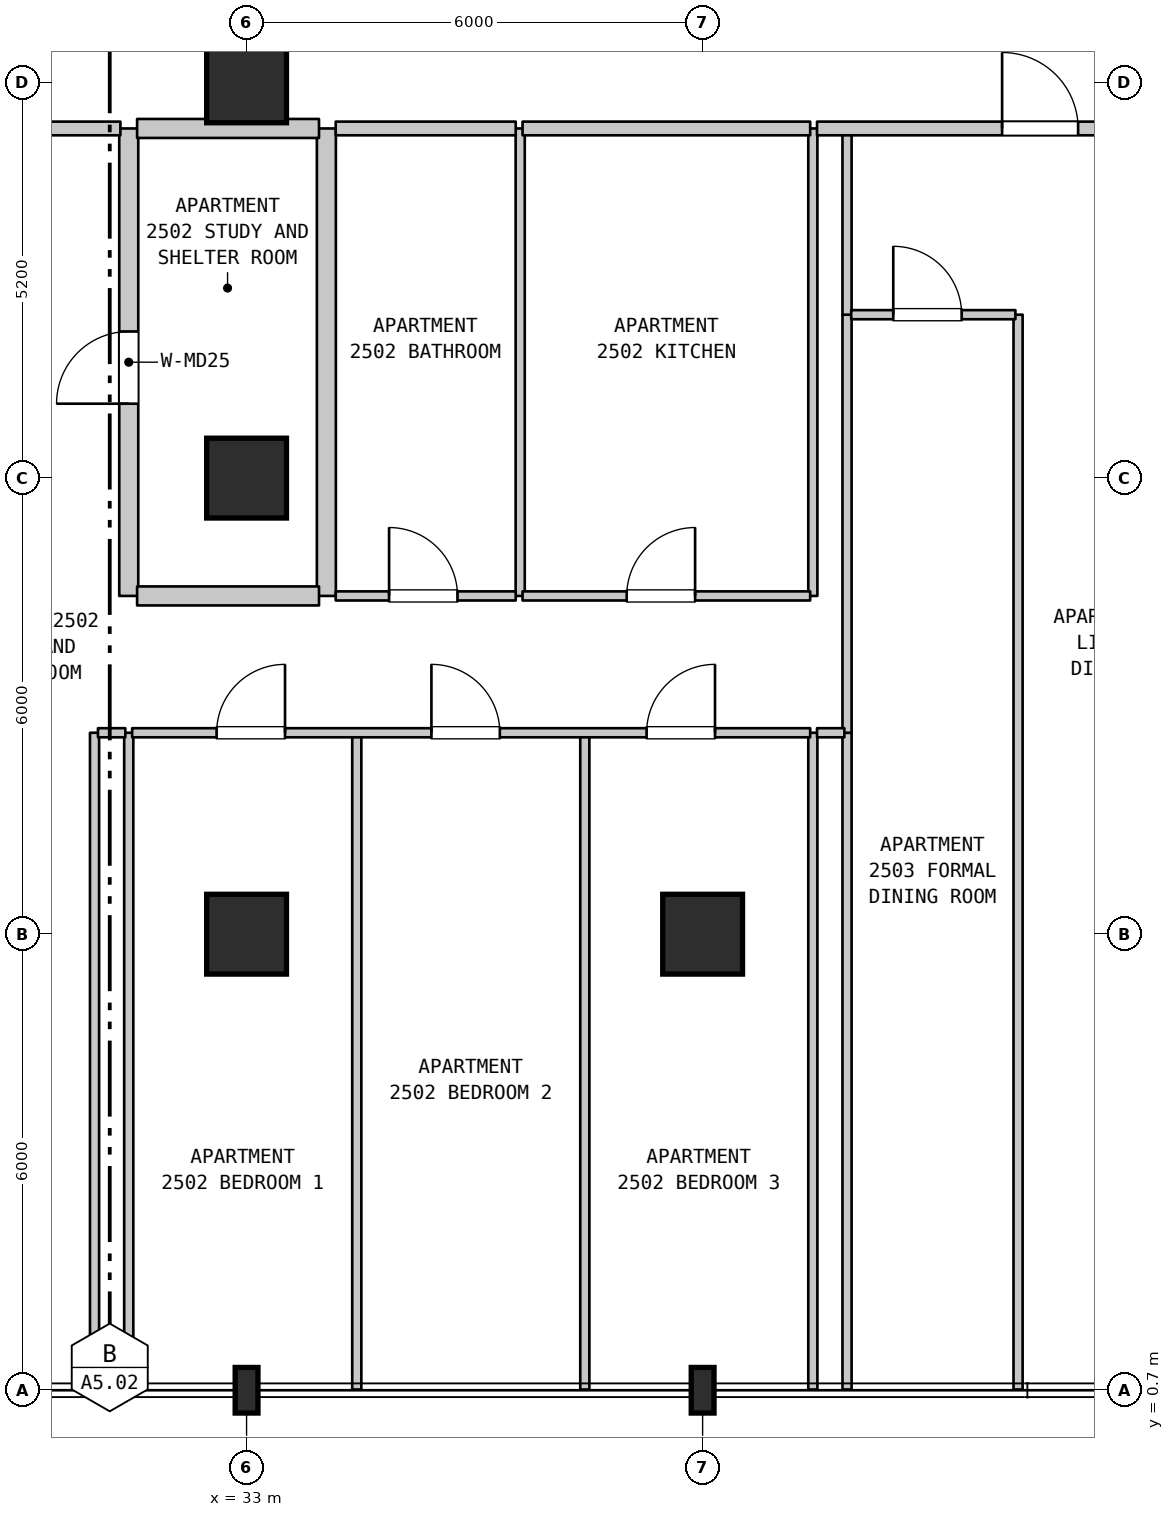
"""IFC4 building model, lengths in metres.
Left out: names, types, materials, properties, quantities, classifications, styles, units other than length and angle.
Written with IfcOpenShell. Run it as: python <this file> out.ifc"""

import sys

from ifc_helpers import new_model, si_unit, direction, frame, frame_2d, origin, origin_2d, place, context, subcontext, project, spatial, rectangle, i_section, extrude, element, fill, save


model = new_model("IFC4")
c1 = context("Model", 3, precision=1e-05, world=origin(), true_north=direction((0.0, 1.0)))
c2 = subcontext(c1, "Body", "Model", "MODEL_VIEW")
j1 = project(units=[si_unit("LENGTHUNIT", "METRE"), si_unit("PLANEANGLEUNIT", "RADIAN")], contexts=[c1])
p1 = place(None, origin())
s1 = spatial("IfcSite", under=j1, at=p1, CompositionType="ELEMENT")
p2 = place(p1, origin())
s2 = spatial("IfcBuilding", under=s1, at=p2, CompositionType="ELEMENT")
p3 = place(p2, frame((0.0, 0.0, 105.7)))
s3 = spatial("IfcBuildingStorey", under=s2, at=p3, CompositionType="ELEMENT", Elevation=105.7)
p4 = place(p3, frame((33.0, 0.7, 0.0), z_axis=(0.0, 0.0, 1.0), x_axis=(1.0, 0.0, 0.0)))
e1 = element("IfcColumn", 1, at=p4, inside=s3, PredefinedType="COLUMN", context=c2, shape_type="SweptSolid", body=[
    extrude(i_section(OverallWidth=0.3, OverallDepth=0.6, WebThickness=0.015, FlangeThickness=0.03, FilletRadius=0.027, at=origin_2d()), origin(), (0.0, 0.0, 1.0), 3.7),
])
for number, where, z_axis, x_axis in (
    (2, (33.0, 6.7, 0.0), (0.0, 0.0, 1.0), (1.0, 0.0, 0.0)),
    (3, (33.0, 12.7, 0.0), (0.0, 0.0, 1.0), (1.0, 0.0, 0.0)),
    (4, (33.0, 17.9, 0.0), (0.0, 0.0, 1.0), (1.0, 0.0, 0.0)),
):
    element("IfcColumn", number, at=place(p3, frame(where, z_axis=z_axis, x_axis=x_axis)), inside=s3, PredefinedType="COLUMN", context=c2, shape_type="SweptSolid", body=[
        extrude(rectangle(XDim=1.05, YDim=1.05, at=origin_2d()), origin(), (0.0, 0.0, 1.0), 3.7),
    ])
p5 = place(p3, frame((39.0, 0.7, 0.0), z_axis=(0.0, 0.0, 1.0), x_axis=(1.0, 0.0, 0.0)))
e5 = element("IfcColumn", 5, at=p5, inside=s3, PredefinedType="COLUMN", context=c2, shape_type="SweptSolid", body=[
    extrude(i_section(OverallWidth=0.3, OverallDepth=0.6, WebThickness=0.015, FlangeThickness=0.03, FilletRadius=0.027, at=origin_2d()), origin(), (0.0, 0.0, 1.0), 3.7),
])
p6 = place(p3, frame((39.0, 6.7, 0.0), z_axis=(0.0, 0.0, 1.0), x_axis=(1.0, 0.0, 0.0)))
e6 = element("IfcColumn", 6, at=p6, inside=s3, PredefinedType="COLUMN", context=c2, shape_type="SweptSolid", body=[
    extrude(rectangle(XDim=1.05, YDim=1.05, at=origin_2d()), origin(), (0.0, 0.0, 1.0), 3.7),
])
for number, where, z_axis, x_axis in (
    (7, (31.0, 0.71, 0.0), (0.0, 0.0, 1.0), (0.0, 1.0, 0.0)),
    (8, (31.45, 0.71, 0.0), (0.0, 0.0, 1.0), (0.0, 1.0, 0.0)),
):
    element("IfcWall", number, at=place(p3, frame(where, z_axis=z_axis, x_axis=x_axis)), inside=s3, PredefinedType="PARTITIONING", context=c2, shape_type="SweptSolid", body=[
        extrude(rectangle(XDim=8.64, YDim=0.12, at=frame_2d((4.32, 0.0))), origin(), (0.0, 0.0, 1.0), 3.385),
    ])
p7 = place(p3, frame((31.45, 11.15, 0.0), z_axis=(0.0, 0.0, 1.0), x_axis=(0.0, 1.0, 0.0)))
e9 = element("IfcWall", 9, at=p7, inside=s3, PredefinedType="STANDARD", context=c2, shape_type="SweptSolid", body=[
    extrude(rectangle(XDim=6.15, YDim=0.25, at=frame_2d((3.075, 0.0))), origin(), (0.0, 0.0, 1.0), 3.385),
])
p8 = place(p7, frame((2.529, 0.0, 0.0)))
e10 = element("IfcOpeningElement", 10, at=p8, cuts=e9, PredefinedType="OPENING", context=c2, shape_type="SweptSolid", body=[
    extrude(rectangle(XDim=0.95, YDim=2.15, at=frame_2d((0.475, 1.075))), frame((0.0, 0.135, 0.0), z_axis=(0.0, -1.0, 0.0), x_axis=(1.0, 0.0, 0.0)), (0.0, 0.0, 1.0), 0.27),
])
p9 = place(p3, frame((34.05, 11.15, 0.0), z_axis=(0.0, 0.0, 1.0), x_axis=(0.0, 1.0, 0.0)))
e11 = element("IfcWall", 11, at=p9, inside=s3, PredefinedType="STANDARD", context=c2, shape_type="SweptSolid", body=[
    extrude(rectangle(XDim=6.15, YDim=0.25, at=frame_2d((3.075, 0.0))), origin(), (0.0, 0.0, 1.0), 3.385),
])
p10 = place(p3, frame((34.45, 0.71, 0.0), z_axis=(0.0, 0.0, 1.0), x_axis=(0.0, 1.0, 0.0)))
e12 = element("IfcWall", 12, at=p10, inside=s3, PredefinedType="PARTITIONING", context=c2, shape_type="SweptSolid", body=[
    extrude(rectangle(XDim=8.64, YDim=0.12, at=frame_2d((4.32, 0.0))), origin(), (0.0, 0.0, 1.0), 3.385),
])
p11 = place(p3, frame((36.6, 11.15, 0.0), z_axis=(0.0, 0.0, 1.0), x_axis=(0.0, 1.0, 0.0)))
e13 = element("IfcWall", 13, at=p11, inside=s3, PredefinedType="PARTITIONING", context=c2, shape_type="SweptSolid", body=[
    extrude(rectangle(XDim=6.15, YDim=0.12, at=frame_2d((3.075, 0.0))), origin(), (0.0, 0.0, 1.0), 3.385),
])
for number, where, z_axis, x_axis in (
    (14, (37.45, 0.71, 0.0), (0.0, 0.0, 1.0), (0.0, 1.0, 0.0)),
    (15, (40.45, 0.71, 0.0), (0.0, 0.0, 1.0), (0.0, 1.0, 0.0)),
):
    element("IfcWall", number, at=place(p3, frame(where, z_axis=z_axis, x_axis=x_axis)), inside=s3, PredefinedType="PARTITIONING", context=c2, shape_type="SweptSolid", body=[
        extrude(rectangle(XDim=8.64, YDim=0.12, at=frame_2d((4.32, 0.0))), origin(), (0.0, 0.0, 1.0), 3.385),
    ])
p12 = place(p3, frame((40.45, 11.15, 0.0), z_axis=(0.0, 0.0, 1.0), x_axis=(0.0, 1.0, 0.0)))
e16 = element("IfcWall", 16, at=p12, inside=s3, PredefinedType="PARTITIONING", context=c2, shape_type="SweptSolid", body=[
    extrude(rectangle(XDim=6.15, YDim=0.12, at=frame_2d((3.075, 0.0))), origin(), (0.0, 0.0, 1.0), 3.385),
])
p13 = place(p3, frame((40.9, 0.71, 0.0), z_axis=(0.0, 0.0, 1.0), x_axis=(0.0, 1.0, 0.0)))
e17 = element("IfcWall", 17, at=p13, inside=s3, PredefinedType="PARTITIONING", context=c2, shape_type="SweptSolid", body=[
    extrude(rectangle(XDim=8.64, YDim=0.12, at=frame_2d((4.32, 0.0))), origin(), (0.0, 0.0, 1.0), 3.385),
])
p14 = place(p3, frame((40.9, 9.35, 0.0), z_axis=(0.0, 0.0, 1.0), x_axis=(0.0, 1.0, 0.0)))
e18 = element("IfcWall", 18, at=p14, inside=s3, PredefinedType="PARTITIONING", context=c2, shape_type="SweptSolid", body=[
    extrude(rectangle(XDim=5.5, YDim=0.12, at=frame_2d((2.75, 0.0))), origin(), (0.0, 0.0, 1.0), 3.385),
])
p15 = place(p3, frame((40.9, 14.85, 0.0), z_axis=(0.0, 0.0, 1.0), x_axis=(0.0, 1.0, 0.0)))
e19 = element("IfcWall", 19, at=p15, inside=s3, PredefinedType="PARTITIONING", context=c2, shape_type="SweptSolid", body=[
    extrude(rectangle(XDim=2.45, YDim=0.12, at=frame_2d((1.225, 0.0))), origin(), (0.0, 0.0, 1.0), 3.385),
])
p16 = place(p3, frame((43.15, 0.71, 0.0), z_axis=(0.0, 0.0, 1.0), x_axis=(0.0, 1.0, 0.0)))
e20 = element("IfcWall", 20, at=p16, inside=s3, PredefinedType="PARTITIONING", context=c2, shape_type="SweptSolid", body=[
    extrude(rectangle(XDim=14.14, YDim=0.12, at=frame_2d((7.07, 0.0))), origin(), (0.0, 0.0, 1.0), 3.385),
])
p17 = place(p3, frame((31.045, 9.35, 0.0), z_axis=(0.0, 0.0, 1.0), x_axis=(1.0, 0.0, 0.0)))
e21 = element("IfcWall", 21, at=p17, inside=s3, PredefinedType="PARTITIONING", context=c2, shape_type="SweptSolid", body=[
    extrude(rectangle(XDim=0.36, YDim=0.12, at=frame_2d((0.18, 0.0))), origin(), (0.0, 0.0, 1.0), 3.385),
])
p18 = place(p3, frame((31.495, 9.35, 0.0), z_axis=(0.0, 0.0, 1.0), x_axis=(1.0, 0.0, 0.0)))
e22 = element("IfcWall", 22, at=p18, inside=s3, PredefinedType="PARTITIONING", context=c2, shape_type="SweptSolid", body=[
    extrude(rectangle(XDim=8.92, YDim=0.12, at=frame_2d((4.46, 0.0))), origin(), (0.0, 0.0, 1.0), 3.385),
])
p19 = place(p18, frame((1.111, 0.0, 0.0)))
e23 = element("IfcOpeningElement", 23, at=p19, cuts=e22, PredefinedType="OPENING", context=c2, shape_type="SweptSolid", body=[
    extrude(rectangle(XDim=0.9, YDim=2.15, at=frame_2d((0.45, 1.075))), frame((0.0, 0.07, 0.0), z_axis=(0.0, -1.0, 0.0), x_axis=(1.0, 0.0, 0.0)), (0.0, 0.0, 1.0), 0.14),
])
p20 = place(p18, frame((3.937, 0.0, 0.0)))
e24 = element("IfcOpeningElement", 24, at=p20, cuts=e22, PredefinedType="OPENING", context=c2, shape_type="SweptSolid", body=[
    extrude(rectangle(XDim=0.9, YDim=2.15, at=frame_2d((0.45, 1.075))), frame((0.0, 0.07, 0.0), z_axis=(0.0, -1.0, 0.0), x_axis=(1.0, 0.0, 0.0)), (0.0, 0.0, 1.0), 0.14),
])
p21 = place(p18, frame((6.768, 0.0, 0.0)))
e25 = element("IfcOpeningElement", 25, at=p21, cuts=e22, PredefinedType="OPENING", context=c2, shape_type="SweptSolid", body=[
    extrude(rectangle(XDim=0.9, YDim=2.15, at=frame_2d((0.45, 1.075))), frame((0.0, 0.07, 0.0), z_axis=(0.0, -1.0, 0.0), x_axis=(1.0, 0.0, 0.0)), (0.0, 0.0, 1.0), 0.14),
])
p22 = place(p3, frame((40.505, 9.35, 0.0), z_axis=(0.0, 0.0, 1.0), x_axis=(1.0, 0.0, 0.0)))
e26 = element("IfcWall", 26, at=p22, inside=s3, PredefinedType="PARTITIONING", context=c2, shape_type="SweptSolid", body=[
    extrude(rectangle(XDim=0.36, YDim=0.12, at=frame_2d((0.18, 0.0))), origin(), (0.0, 0.0, 1.0), 3.385),
])
p23 = place(p3, frame((31.56, 11.15, 0.0), z_axis=(0.0, 0.0, 1.0), x_axis=(1.0, 0.0, 0.0)))
e27 = element("IfcWall", 27, at=p23, inside=s3, PredefinedType="STANDARD", context=c2, shape_type="SweptSolid", body=[
    extrude(rectangle(XDim=2.393, YDim=0.25, at=frame_2d((1.196, 0.0))), origin(), (0.0, 0.0, 1.0), 3.385),
])
p24 = place(p3, frame((34.173, 11.15, 0.0), z_axis=(0.0, 0.0, 1.0), x_axis=(1.0, 0.0, 0.0)))
e28 = element("IfcWall", 28, at=p24, inside=s3, PredefinedType="PARTITIONING", context=c2, shape_type="SweptSolid", body=[
    extrude(rectangle(XDim=2.368, YDim=0.12, at=frame_2d((1.184, 0.0))), origin(), (0.0, 0.0, 1.0), 3.385),
])
p25 = place(p24, frame((0.702, 0.0, 0.0)))
e29 = element("IfcOpeningElement", 29, at=p25, cuts=e28, PredefinedType="OPENING", context=c2, shape_type="SweptSolid", body=[
    extrude(rectangle(XDim=0.9, YDim=2.1, at=frame_2d((0.45, 1.05))), frame((0.0, 0.07, 0.0), z_axis=(0.0, -1.0, 0.0), x_axis=(1.0, 0.0, 0.0)), (0.0, 0.0, 1.0), 0.14),
])
p26 = place(p3, frame((36.631, 11.15, 0.0), z_axis=(0.0, 0.0, 1.0), x_axis=(1.0, 0.0, 0.0)))
e30 = element("IfcWall", 30, at=p26, inside=s3, PredefinedType="PARTITIONING", context=c2, shape_type="SweptSolid", body=[
    extrude(rectangle(XDim=3.784, YDim=0.12, at=frame_2d((1.892, 0.0))), origin(), (0.0, 0.0, 1.0), 3.385),
])
p27 = place(p26, frame((1.37, 0.0, 0.0)))
e31 = element("IfcOpeningElement", 31, at=p27, cuts=e30, PredefinedType="OPENING", context=c2, shape_type="SweptSolid", body=[
    extrude(rectangle(XDim=0.9, YDim=2.15, at=frame_2d((0.45, 1.075))), frame((0.0, 0.07, 0.0), z_axis=(0.0, -1.0, 0.0), x_axis=(1.0, 0.0, 0.0)), (0.0, 0.0, 1.0), 0.14),
])
p28 = place(p3, frame((40.955, 14.85, 0.0), z_axis=(0.0, 0.0, 1.0), x_axis=(1.0, 0.0, 0.0)))
e32 = element("IfcWall", 32, at=p28, inside=s3, PredefinedType="PARTITIONING", context=c2, shape_type="SweptSolid", body=[
    extrude(rectangle(XDim=2.16, YDim=0.12, at=frame_2d((1.08, 0.0))), origin(), (0.0, 0.0, 1.0), 3.385),
])
p29 = place(p28, frame((0.553, 0.0, 0.0)))
e33 = element("IfcOpeningElement", 33, at=p29, cuts=e32, PredefinedType="OPENING", context=c2, shape_type="SweptSolid", body=[
    extrude(rectangle(XDim=0.9, YDim=2.15, at=frame_2d((0.45, 1.075))), frame((0.0, 0.07, 0.0), z_axis=(0.0, -1.0, 0.0), x_axis=(1.0, 0.0, 0.0)), (0.0, 0.0, 1.0), 0.14),
])
p30 = place(p3, frame((26.245, 17.3, 0.0), z_axis=(0.0, 0.0, 1.0), x_axis=(1.0, 0.0, 0.0)))
e34 = element("IfcWall", 34, at=p30, inside=s3, PredefinedType="STANDARD", context=c2, shape_type="SweptSolid", body=[
    extrude(rectangle(XDim=5.095, YDim=0.18, at=frame_2d((2.547, 0.0))), origin(), (0.0, 0.0, 1.0), 3.385),
])
p31 = place(p30, frame((2.08, 0.0, 0.0)))
e35 = element("IfcOpeningElement", 35, at=p31, cuts=e34, PredefinedType="OPENING", context=c2, shape_type="SweptSolid", body=[
    extrude(rectangle(XDim=1.0, YDim=2.15, at=frame_2d((0.5, 1.075))), frame((0.0, 0.1, 0.0), z_axis=(0.0, -1.0, 0.0), x_axis=(1.0, 0.0, 0.0)), (0.0, 0.0, 1.0), 0.2),
])
p32 = place(p3, frame((31.56, 17.3, 0.0), z_axis=(0.0, 0.0, 1.0), x_axis=(1.0, 0.0, 0.0)))
e36 = element("IfcWall", 36, at=p32, inside=s3, PredefinedType="STANDARD", context=c2, shape_type="SweptSolid", body=[
    extrude(rectangle(XDim=2.393, YDim=0.25, at=frame_2d((1.196, 0.0))), origin(), (0.0, 0.0, 1.0), 3.385),
])
p33 = place(p3, frame((34.173, 17.3, 0.0), z_axis=(0.0, 0.0, 1.0), x_axis=(1.0, 0.0, 0.0)))
e37 = element("IfcWall", 37, at=p33, inside=s3, PredefinedType="STANDARD", context=c2, shape_type="SweptSolid", body=[
    extrude(rectangle(XDim=2.368, YDim=0.18, at=frame_2d((1.184, 0.0))), origin(), (0.0, 0.0, 1.0), 3.385),
])
p34 = place(p3, frame((36.631, 17.3, 0.0), z_axis=(0.0, 0.0, 1.0), x_axis=(1.0, 0.0, 0.0)))
e38 = element("IfcWall", 38, at=p34, inside=s3, PredefinedType="STANDARD", context=c2, shape_type="SweptSolid", body=[
    extrude(rectangle(XDim=3.784, YDim=0.18, at=frame_2d((1.892, 0.0))), origin(), (0.0, 0.0, 1.0), 3.385),
])
p35 = place(p3, frame((40.505, 17.3, 0.0), z_axis=(0.0, 0.0, 1.0), x_axis=(1.0, 0.0, 0.0)))
e39 = element("IfcWall", 39, at=p35, inside=s3, PredefinedType="STANDARD", context=c2, shape_type="SweptSolid", body=[
    extrude(rectangle(XDim=5.545, YDim=0.18, at=frame_2d((2.772, 0.0))), origin(), (0.0, 0.0, 1.0), 3.385),
])
p36 = place(p35, frame((2.435, 0.0, 0.0)))
e40 = element("IfcOpeningElement", 40, at=p36, cuts=e39, PredefinedType="OPENING", context=c2, shape_type="SweptSolid", body=[
    extrude(rectangle(XDim=1.0, YDim=2.15, at=frame_2d((0.5, 1.075))), frame((0.0, 0.1, 0.0), z_axis=(0.0, -1.0, 0.0), x_axis=(1.0, 0.0, 0.0)), (0.0, 0.0, 1.0), 0.2),
])
p37 = place(p8, origin())
e41 = element("IfcDoor", 41, at=p37, inside=s3, OperationType="SINGLE_SWING_LEFT", PredefinedType="DOOR", context=c2, shape_type="SweptSolid", body=[
    extrude(rectangle(XDim=0.95, YDim=2.15, at=frame_2d((0.475, 1.075))), frame((0.0, 0.025, 0.0), z_axis=(0.0, -1.0, 0.0), x_axis=(1.0, 0.0, 0.0)), (0.0, 0.0, 1.0), 0.05),
])
fill(e10, e41)
p38 = place(p19, origin())
e42 = element("IfcDoor", 42, at=p38, inside=s3, OperationType="SINGLE_SWING_RIGHT", PredefinedType="DOOR", context=c2, shape_type="SweptSolid", body=[
    extrude(rectangle(XDim=0.9, YDim=2.15, at=frame_2d((0.45, 1.075))), frame((0.0, 0.025, 0.0), z_axis=(0.0, -1.0, 0.0), x_axis=(1.0, 0.0, 0.0)), (0.0, 0.0, 1.0), 0.05),
])
fill(e23, e42)
p39 = place(p20, origin())
e43 = element("IfcDoor", 43, at=p39, inside=s3, OperationType="SINGLE_SWING_LEFT", PredefinedType="DOOR", context=c2, shape_type="SweptSolid", body=[
    extrude(rectangle(XDim=0.9, YDim=2.15, at=frame_2d((0.45, 1.075))), frame((0.0, 0.025, 0.0), z_axis=(0.0, -1.0, 0.0), x_axis=(1.0, 0.0, 0.0)), (0.0, 0.0, 1.0), 0.05),
])
fill(e24, e43)
p40 = place(p21, origin())
e44 = element("IfcDoor", 44, at=p40, inside=s3, OperationType="SINGLE_SWING_RIGHT", PredefinedType="DOOR", context=c2, shape_type="SweptSolid", body=[
    extrude(rectangle(XDim=0.9, YDim=2.15, at=frame_2d((0.45, 1.075))), frame((0.0, 0.025, 0.0), z_axis=(0.0, -1.0, 0.0), x_axis=(1.0, 0.0, 0.0)), (0.0, 0.0, 1.0), 0.05),
])
fill(e25, e44)
p41 = place(p25, origin())
e45 = element("IfcDoor", 45, at=p41, inside=s3, OperationType="SINGLE_SWING_LEFT", PredefinedType="DOOR", context=c2, shape_type="SweptSolid", body=[
    extrude(rectangle(XDim=0.9, YDim=2.1, at=frame_2d((0.45, 1.05))), frame((0.0, 0.025, 0.0), z_axis=(0.0, -1.0, 0.0), x_axis=(1.0, 0.0, 0.0)), (0.0, 0.0, 1.0), 0.05),
])
fill(e29, e45)
p42 = place(p27, origin())
e46 = element("IfcDoor", 46, at=p42, inside=s3, OperationType="SINGLE_SWING_RIGHT", PredefinedType="DOOR", context=c2, shape_type="SweptSolid", body=[
    extrude(rectangle(XDim=0.9, YDim=2.15, at=frame_2d((0.45, 1.075))), frame((0.0, 0.025, 0.0), z_axis=(0.0, -1.0, 0.0), x_axis=(1.0, 0.0, 0.0)), (0.0, 0.0, 1.0), 0.05),
])
fill(e31, e46)
p43 = place(p29, origin())
e47 = element("IfcDoor", 47, at=p43, inside=s3, OperationType="SINGLE_SWING_LEFT", PredefinedType="DOOR", context=c2, shape_type="SweptSolid", body=[
    extrude(rectangle(XDim=0.9, YDim=2.15, at=frame_2d((0.45, 1.075))), frame((0.0, 0.025, 0.0), z_axis=(0.0, -1.0, 0.0), x_axis=(1.0, 0.0, 0.0)), (0.0, 0.0, 1.0), 0.05),
])
fill(e33, e47)
p44 = place(p36, origin())
e48 = element("IfcDoor", 48, at=p44, inside=s3, OperationType="SINGLE_SWING_LEFT", PredefinedType="DOOR", context=c2, shape_type="SweptSolid", body=[
    extrude(rectangle(XDim=1.0, YDim=2.15, at=frame_2d((0.5, 1.075))), frame((0.0, 0.025, 0.0), z_axis=(0.0, -1.0, 0.0), x_axis=(1.0, 0.0, 0.0)), (0.0, 0.0, 1.0), 0.05),
])
fill(e40, e48)
save(model, sys.argv[1])
